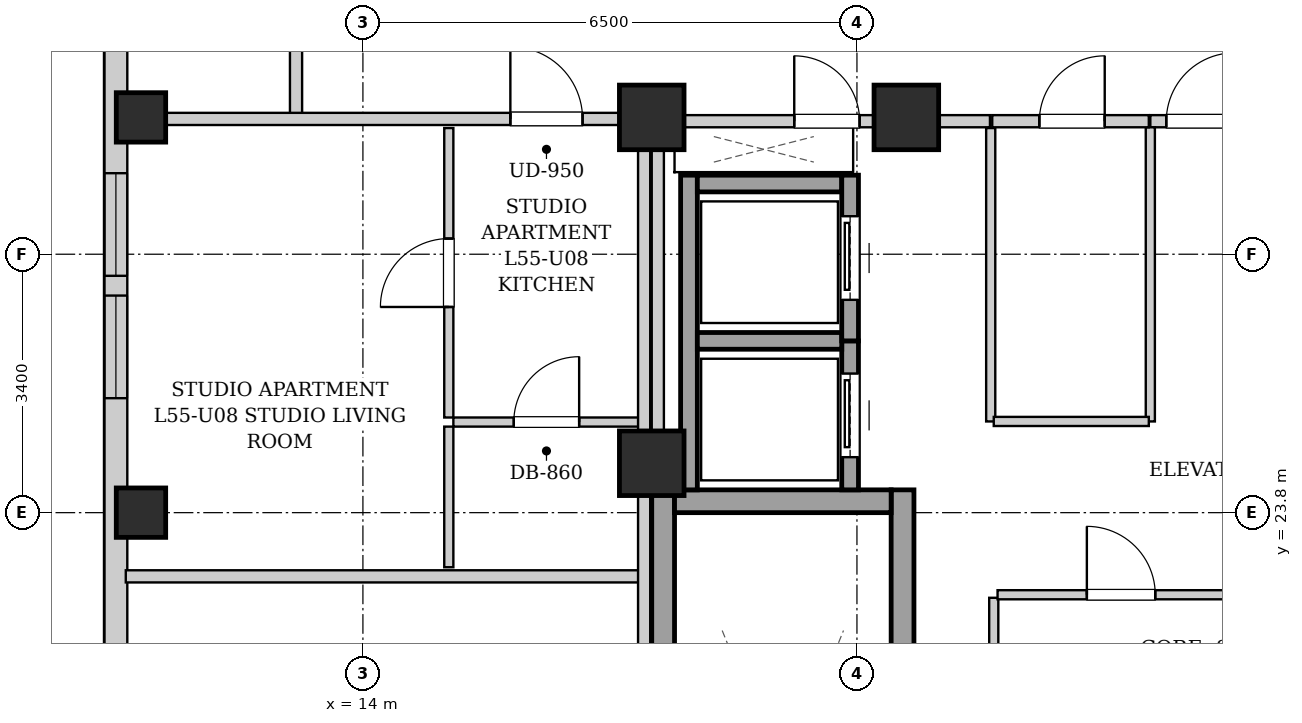
"""IFC4 building model, lengths in metres.
Left out: names, types, materials, properties, quantities, classifications, styles, units other than length and angle.
Written with IfcOpenShell. Run it as: python <this file> out.ifc"""

import sys

from ifc_helpers import new_model, si_unit, direction, frame, frame_2d, origin, origin_2d, place, context, subcontext, project, spatial, rectangle, extrude, element, fill, save


model = new_model("IFC4")
c1 = context("Model", 3, precision=1e-05, world=origin(), true_north=direction((0.0, 1.0)))
c2 = subcontext(c1, "Body", "Model", "MODEL_VIEW")
j1 = project(units=[si_unit("LENGTHUNIT", "METRE"), si_unit("PLANEANGLEUNIT", "RADIAN")], contexts=[c1])
p1 = place(None, origin())
s1 = spatial("IfcSite", under=j1, at=p1, CompositionType="ELEMENT")
p2 = place(p1, origin())
s2 = spatial("IfcBuilding", under=s1, at=p2, CompositionType="ELEMENT")
p3 = place(p2, frame((0.0, 0.0, 190.9)))
s3 = spatial("IfcBuildingStorey", under=s2, at=p3, CompositionType="ELEMENT", Elevation=190.9)
for number, where, z_axis, x_axis in (
    (1, (11.08, 23.8, 0.0), (0.0, 0.0, 1.0), (1.0, 0.0, 0.0)),
    (2, (11.08, 29.0, 0.0), (0.0, 0.0, 1.0), (1.0, 0.0, 0.0)),
):
    element("IfcColumn", number, at=place(p3, frame(where, z_axis=z_axis, x_axis=x_axis)), inside=s3, PredefinedType="COLUMN", context=c2, shape_type="SweptSolid", body=[
        extrude(rectangle(XDim=0.65, YDim=0.65, at=origin_2d()), origin(), (0.0, 0.0, 1.0), 3.3),
    ])
for number, where, z_axis, x_axis in (
    (3, (17.8, 29.0, 0.0), (0.0, 0.0, 1.0), (1.0, 0.0, 0.0)),
    (4, (21.15, 29.0, 0.0), (0.0, 0.0, 1.0), (1.0, 0.0, 0.0)),
    (5, (17.8, 24.45, 0.0), (0.0, 0.0, 1.0), (1.0, 0.0, 0.0)),
):
    element("IfcColumn", number, at=place(p3, frame(where, z_axis=z_axis, x_axis=x_axis)), inside=s3, PredefinedType="COLUMN", context=c2, shape_type="SweptSolid", body=[
        extrude(rectangle(XDim=0.85, YDim=0.85, at=origin_2d()), origin(), (0.0, 0.0, 1.0), 3.3),
    ])
p4 = place(p3, frame((10.75, 6.3, 0.0), z_axis=(0.0, 0.0, 1.0), x_axis=(0.0, 1.0, 0.0)))
e6 = element("IfcWall", 6, at=p4, inside=s3, PredefinedType="SOLIDWALL", context=c2, shape_type="SweptSolid", body=[
    extrude(rectangle(XDim=31.4, YDim=0.3, at=frame_2d((15.7, 0.0))), origin(), (0.0, 0.0, 1.0), 3.04),
])
p5 = place(p4, frame((1.504, 0.0, 0.55)))
e7 = element("IfcOpeningElement", 7, at=p5, cuts=e6, PredefinedType="OPENING", context=c2, shape_type="SweptSolid", body=[
    extrude(rectangle(XDim=1.35, YDim=1.2, at=frame_2d((0.675, 0.6))), frame((0.0, 0.16, 0.0), z_axis=(0.0, -1.0, 0.0), x_axis=(1.0, 0.0, 0.0)), (0.0, 0.0, 1.0), 0.32),
])
p6 = place(p4, frame((28.546, 0.0, 0.55)))
e8 = element("IfcOpeningElement", 8, at=p6, cuts=e6, PredefinedType="OPENING", context=c2, shape_type="SweptSolid", body=[
    extrude(rectangle(XDim=1.35, YDim=1.2, at=frame_2d((0.675, 0.6))), frame((0.0, 0.16, 0.0), z_axis=(0.0, -1.0, 0.0), x_axis=(1.0, 0.0, 0.0)), (0.0, 0.0, 1.0), 0.32),
])
p7 = place(p4, frame((11.85, 0.0, 0.55)))
e9 = element("IfcOpeningElement", 9, at=p7, cuts=e6, PredefinedType="OPENING", context=c2, shape_type="SweptSolid", body=[
    extrude(rectangle(XDim=1.35, YDim=1.2, at=frame_2d((0.675, 0.6))), frame((0.0, 0.16, 0.0), z_axis=(0.0, -1.0, 0.0), x_axis=(1.0, 0.0, 0.0)), (0.0, 0.0, 1.0), 0.32),
])
p8 = place(p4, frame((9.185, 0.0, 0.55)))
e10 = element("IfcOpeningElement", 10, at=p8, cuts=e6, PredefinedType="OPENING", context=c2, shape_type="SweptSolid", body=[
    extrude(rectangle(XDim=1.35, YDim=1.2, at=frame_2d((0.675, 0.6))), frame((0.0, 0.16, 0.0), z_axis=(0.0, -1.0, 0.0), x_axis=(1.0, 0.0, 0.0)), (0.0, 0.0, 1.0), 0.32),
])
p9 = place(p4, frame((19.006, 0.0, 0.55)))
e11 = element("IfcOpeningElement", 11, at=p9, cuts=e6, PredefinedType="OPENING", context=c2, shape_type="SweptSolid", body=[
    extrude(rectangle(XDim=1.35, YDim=1.2, at=frame_2d((0.675, 0.6))), frame((0.0, 0.16, 0.0), z_axis=(0.0, -1.0, 0.0), x_axis=(1.0, 0.0, 0.0)), (0.0, 0.0, 1.0), 0.32),
])
p10 = place(p4, frame((20.616, 0.0, 0.55)))
e12 = element("IfcOpeningElement", 12, at=p10, cuts=e6, PredefinedType="OPENING", context=c2, shape_type="SweptSolid", body=[
    extrude(rectangle(XDim=1.35, YDim=1.2, at=frame_2d((0.675, 0.6))), frame((0.0, 0.16, 0.0), z_axis=(0.0, -1.0, 0.0), x_axis=(1.0, 0.0, 0.0)), (0.0, 0.0, 1.0), 0.32),
])
for number, where, z_axis, x_axis in (
    (13, (17.95, 15.1, 0.0), (0.0, 0.0, 1.0), (0.0, 1.0, 0.0)),
    (14, (21.1, 15.1, 0.0), (0.0, 0.0, 1.0), (0.0, 1.0, 0.0)),
):
    element("IfcWall", number, at=place(p3, frame(where, z_axis=z_axis, x_axis=x_axis)), inside=s3, PredefinedType="SHEAR", context=c2, shape_type="SweptSolid", body=[
        extrude(rectangle(XDim=9.0, YDim=0.3, at=frame_2d((4.5, 0.0))), origin(), (0.0, 0.0, 1.0), 3.04),
    ])
p11 = place(p3, frame((18.1, 23.95, 0.0), z_axis=(0.0, 0.0, 1.0), x_axis=(1.0, 0.0, 0.0)))
e15 = element("IfcWall", 15, at=p11, inside=s3, PredefinedType="SHEAR", context=c2, shape_type="SweptSolid", body=[
    extrude(rectangle(XDim=2.85, YDim=0.3, at=frame_2d((1.425, 0.0))), origin(), (0.0, 0.0, 1.0), 3.04),
])
p12 = place(p3, frame((18.29, 24.1, 0.0), z_axis=(0.0, 0.0, 1.0), x_axis=(0.0, 1.0, 0.0)))
e16 = element("IfcWall", 16, at=p12, inside=s3, PredefinedType="SHEAR", context=c2, shape_type="SweptSolid", body=[
    extrude(rectangle(XDim=4.14, YDim=0.22, at=frame_2d((2.07, 0.0))), origin(), (0.0, 0.0, 1.0), 3.04),
])
p13 = place(p3, frame((20.41, 24.1, 0.0), z_axis=(0.0, 0.0, 1.0), x_axis=(0.0, 1.0, 0.0)))
e17 = element("IfcWall", 17, at=p13, inside=s3, PredefinedType="SHEAR", context=c2, shape_type="SweptSolid", body=[
    extrude(rectangle(XDim=1.96, YDim=0.22, at=frame_2d((0.98, 0.0))), origin(), (0.0, 0.0, 1.0), 3.04),
])
p14 = place(p13, frame((0.43, 0.0, 0.0)))
e18 = element("IfcOpeningElement", 18, at=p14, cuts=e17, PredefinedType="OPENING", context=c2, shape_type="SweptSolid", body=[
    extrude(rectangle(XDim=1.1, YDim=2.15, at=frame_2d((0.55, 1.075))), frame((0.0, 0.12, 0.0), z_axis=(0.0, -1.0, 0.0), x_axis=(1.0, 0.0, 0.0)), (0.0, 0.0, 1.0), 0.24),
])
for number, where, z_axis, x_axis in (
    (19, (18.4, 26.06, 0.0), (0.0, 0.0, 1.0), (1.0, 0.0, 0.0)),
    (20, (18.4, 28.13, 0.0), (0.0, 0.0, 1.0), (1.0, 0.0, 0.0)),
):
    element("IfcWall", number, at=place(p3, frame(where, z_axis=z_axis, x_axis=x_axis)), inside=s3, PredefinedType="SHEAR", context=c2, shape_type="SweptSolid", body=[
        extrude(rectangle(XDim=1.9, YDim=0.22, at=frame_2d((0.95, 0.0))), origin(), (0.0, 0.0, 1.0), 3.04),
    ])
p15 = place(p3, frame((20.41, 26.06, 0.0), z_axis=(0.0, 0.0, 1.0), x_axis=(0.0, 1.0, 0.0)))
e21 = element("IfcWall", 21, at=p15, inside=s3, PredefinedType="SHEAR", context=c2, shape_type="SweptSolid", body=[
    extrude(rectangle(XDim=2.18, YDim=0.22, at=frame_2d((1.09, 0.0))), origin(), (0.0, 0.0, 1.0), 3.04),
])
p16 = place(p15, frame((0.54, 0.0, 0.0)))
e22 = element("IfcOpeningElement", 22, at=p16, cuts=e21, PredefinedType="OPENING", context=c2, shape_type="SweptSolid", body=[
    extrude(rectangle(XDim=1.1, YDim=2.15, at=frame_2d((0.55, 1.075))), frame((0.0, 0.12, 0.0), z_axis=(0.0, -1.0, 0.0), x_axis=(1.0, 0.0, 0.0)), (0.0, 0.0, 1.0), 0.24),
])
p17 = place(p3, frame((17.88, 24.12, 0.0), z_axis=(0.0, 0.0, 1.0), x_axis=(0.0, 1.0, 0.0)))
e23 = element("IfcWall", 23, at=p17, inside=s3, PredefinedType="PARTITIONING", context=c2, shape_type="SweptSolid", body=[
    extrude(rectangle(XDim=4.76, YDim=0.16, at=frame_2d((2.38, 0.0))), origin(), (0.0, 0.0, 1.0), 3.04),
])
p18 = place(p3, frame((24.36, 28.95, 0.0), z_axis=(0.0, 0.0, 1.0), x_axis=(1.0, 0.0, 0.0)))
e24 = element("IfcWall", 24, at=p18, inside=s3, PredefinedType="PARTITIONING", context=c2, shape_type="SweptSolid", body=[
    extrude(rectangle(XDim=1.32, YDim=0.16, at=frame_2d((0.66, 0.0))), origin(), (0.0, 0.0, 1.0), 2.556),
])
p19 = place(p18, frame((0.21, 0.0, 0.0)))
e25 = element("IfcOpeningElement", 25, at=p19, cuts=e24, PredefinedType="OPENING", context=c2, shape_type="SweptSolid", body=[
    extrude(rectangle(XDim=0.9, YDim=2.05, at=frame_2d((0.45, 1.025))), frame((0.0, 0.09, 0.0), z_axis=(0.0, -1.0, 0.0), x_axis=(1.0, 0.0, 0.0)), (0.0, 0.0, 1.0), 0.18),
])
p20 = place(p3, frame((17.96, 28.95, 0.0), z_axis=(0.0, 0.0, 1.0), x_axis=(1.0, 0.0, 0.0)))
e26 = element("IfcWall", 26, at=p20, inside=s3, PredefinedType="PARTITIONING", context=c2, shape_type="SweptSolid", body=[
    extrude(rectangle(XDim=4.29, YDim=0.16, at=frame_2d((2.145, 0.0))), origin(), (0.0, 0.0, 1.0), 2.556),
])
p21 = place(p20, frame((1.715, 0.0, 0.0)))
e27 = element("IfcOpeningElement", 27, at=p21, cuts=e26, PredefinedType="OPENING", context=c2, shape_type="SweptSolid", body=[
    extrude(rectangle(XDim=0.86, YDim=2.05, at=frame_2d((0.43, 1.025))), frame((0.0, 0.09, 0.0), z_axis=(0.0, -1.0, 0.0), x_axis=(1.0, 0.0, 0.0)), (0.0, 0.0, 1.0), 0.18),
])
p22 = place(p3, frame((24.36, 25.0, 0.0), z_axis=(0.0, 0.0, 1.0), x_axis=(0.0, 1.0, 0.0)))
e28 = element("IfcWall", 28, at=p22, inside=s3, PredefinedType="PARTITIONING", context=c2, shape_type="SweptSolid", body=[
    extrude(rectangle(XDim=3.87, YDim=0.12, at=frame_2d((1.935, 0.0))), origin(), (0.0, 0.0, 1.0), 3.04),
])
p23 = place(p3, frame((22.26, 25.0, 0.0), z_axis=(0.0, 0.0, 1.0), x_axis=(0.0, 1.0, 0.0)))
e29 = element("IfcWall", 29, at=p23, inside=s3, PredefinedType="PARTITIONING", context=c2, shape_type="SweptSolid", body=[
    extrude(rectangle(XDim=3.86, YDim=0.12, at=frame_2d((1.93, 0.0))), origin(), (0.0, 0.0, 1.0), 3.04),
])
p24 = place(p3, frame((22.3, 25.0, 0.0), z_axis=(0.0, 0.0, 1.0), x_axis=(1.0, 0.0, 0.0)))
e30 = element("IfcWall", 30, at=p24, inside=s3, PredefinedType="PARTITIONING", context=c2, shape_type="SweptSolid", body=[
    extrude(rectangle(XDim=2.04, YDim=0.12, at=frame_2d((1.02, 0.0))), origin(), (0.0, 0.0, 1.0), 3.04),
])
p25 = place(p3, frame((22.28, 28.95, 0.0), z_axis=(0.0, 0.0, 1.0), x_axis=(1.0, 0.0, 0.0)))
e31 = element("IfcWall", 31, at=p25, inside=s3, PredefinedType="PARTITIONING", context=c2, shape_type="SweptSolid", body=[
    extrude(rectangle(XDim=2.06, YDim=0.16, at=frame_2d((1.03, 0.0))), origin(), (0.0, 0.0, 1.0), 2.556),
])
p26 = place(p25, frame((0.62, 0.0, 0.0)))
e32 = element("IfcOpeningElement", 32, at=p26, cuts=e31, PredefinedType="OPENING", context=c2, shape_type="SweptSolid", body=[
    extrude(rectangle(XDim=0.86, YDim=2.05, at=frame_2d((0.43, 1.025))), frame((0.0, 0.09, 0.0), z_axis=(0.0, -1.0, 0.0), x_axis=(1.0, 0.0, 0.0)), (0.0, 0.0, 1.0), 0.18),
])
p27 = place(p3, frame((22.3, 20.62, 0.0), z_axis=(0.0, 0.0, 1.0), x_axis=(0.0, 1.0, 0.0)))
e33 = element("IfcWall", 33, at=p27, inside=s3, PredefinedType="PARTITIONING", context=c2, shape_type="SweptSolid", body=[
    extrude(rectangle(XDim=2.06, YDim=0.12, at=frame_2d((1.03, 0.0))), origin(), (0.0, 0.0, 1.0), 3.04),
])
p28 = place(p3, frame((22.35, 22.72, 0.0), z_axis=(0.0, 0.0, 1.0), x_axis=(1.0, 0.0, 0.0)))
e34 = element("IfcWall", 34, at=p28, inside=s3, PredefinedType="PARTITIONING", context=c2, shape_type="SweptSolid", body=[
    extrude(rectangle(XDim=7.27, YDim=0.12, at=frame_2d((3.635, 0.0))), origin(), (0.0, 0.0, 1.0), 3.04),
])
p29 = place(p28, frame((1.175, 0.0, 0.0)))
e35 = element("IfcOpeningElement", 35, at=p29, cuts=e34, PredefinedType="OPENING", context=c2, shape_type="SweptSolid", body=[
    extrude(rectangle(XDim=0.9, YDim=2.05, at=frame_2d((0.45, 1.025))), frame((0.0, 0.07, 0.0), z_axis=(0.0, -1.0, 0.0), x_axis=(1.0, 0.0, 0.0)), (0.0, 0.0, 1.0), 0.14),
])
p30 = place(p28, frame((4.725, 0.0, 0.0)))
e36 = element("IfcOpeningElement", 36, at=p30, cuts=e34, PredefinedType="OPENING", context=c2, shape_type="SweptSolid", body=[
    extrude(rectangle(XDim=0.9, YDim=2.05, at=frame_2d((0.45, 1.025))), frame((0.0, 0.07, 0.0), z_axis=(0.0, -1.0, 0.0), x_axis=(1.0, 0.0, 0.0)), (0.0, 0.0, 1.0), 0.14),
])
p31 = place(p3, frame((13.12, 28.98, 0.0), z_axis=(0.0, 0.0, 1.0), x_axis=(0.0, 1.0, 0.0)))
e37 = element("IfcWall", 37, at=p31, inside=s3, PredefinedType="PARTITIONING", context=c2, shape_type="SweptSolid", body=[
    extrude(rectangle(XDim=1.58, YDim=0.16, at=frame_2d((0.79, 0.0))), origin(), (0.0, 0.0, 1.0), 3.04),
])
p32 = place(p3, frame((10.88, 22.962, 0.0), z_axis=(0.0, 0.0, 1.0), x_axis=(1.0, 0.0, 0.0)))
e38 = element("IfcWall", 38, at=p32, inside=s3, PredefinedType="PARTITIONING", context=c2, shape_type="SweptSolid", body=[
    extrude(rectangle(XDim=6.76, YDim=0.16, at=frame_2d((3.38, 0.0))), origin(), (0.0, 0.0, 1.0), 3.04),
])
p33 = place(p3, frame((10.88, 28.98, 0.0), z_axis=(0.0, 0.0, 1.0), x_axis=(1.0, 0.0, 0.0)))
e39 = element("IfcWall", 39, at=p33, inside=s3, PredefinedType="PARTITIONING", context=c2, shape_type="SweptSolid", body=[
    extrude(rectangle(XDim=6.88, YDim=0.16, at=frame_2d((3.44, 0.0))), origin(), (0.0, 0.0, 1.0), 2.556),
])
p34 = place(p33, frame((5.06, 0.0, 0.0)))
e40 = element("IfcOpeningElement", 40, at=p34, cuts=e39, PredefinedType="OPENING", context=c2, shape_type="SweptSolid", body=[
    extrude(rectangle(XDim=0.95, YDim=2.1, at=frame_2d((0.475, 1.05))), frame((0.0, 0.09, 0.0), z_axis=(0.0, -1.0, 0.0), x_axis=(1.0, 0.0, 0.0)), (0.0, 0.0, 1.0), 0.18),
])
p35 = place(p3, frame((15.19, 24.992, 0.0), z_axis=(0.0, 0.0, 1.0), x_axis=(1.0, 0.0, 0.0)))
e41 = element("IfcWall", 41, at=p35, inside=s3, PredefinedType="PARTITIONING", context=c2, shape_type="SweptSolid", body=[
    extrude(rectangle(XDim=2.45, YDim=0.12, at=frame_2d((1.225, 0.0))), origin(), (0.0, 0.0, 1.0), 3.04),
])
p36 = place(p35, frame((0.795, 0.0, 0.0)))
e42 = element("IfcOpeningElement", 42, at=p36, cuts=e41, PredefinedType="OPENING", context=c2, shape_type="SweptSolid", body=[
    extrude(rectangle(XDim=0.86, YDim=2.05, at=frame_2d((0.43, 1.025))), frame((0.0, 0.07, 0.0), z_axis=(0.0, -1.0, 0.0), x_axis=(1.0, 0.0, 0.0)), (0.0, 0.0, 1.0), 0.14),
])
p37 = place(p3, frame((15.13, 23.082, 0.0), z_axis=(0.0, 0.0, 1.0), x_axis=(0.0, 1.0, 0.0)))
e43 = element("IfcWall", 43, at=p37, inside=s3, PredefinedType="PARTITIONING", context=c2, shape_type="SweptSolid", body=[
    extrude(rectangle(XDim=1.85, YDim=0.12, at=frame_2d((0.925, 0.0))), origin(), (0.0, 0.0, 1.0), 3.04),
])
p38 = place(p3, frame((15.13, 25.052, 0.0), z_axis=(0.0, 0.0, 1.0), x_axis=(0.0, 1.0, 0.0)))
e44 = element("IfcWall", 44, at=p38, inside=s3, PredefinedType="PARTITIONING", context=c2, shape_type="SweptSolid", body=[
    extrude(rectangle(XDim=3.808, YDim=0.12, at=frame_2d((1.904, 0.0))), origin(), (0.0, 0.0, 1.0), 3.04),
])
p39 = place(p38, frame((1.454, 0.0, 0.0)))
e45 = element("IfcOpeningElement", 45, at=p39, cuts=e44, PredefinedType="OPENING", context=c2, shape_type="SweptSolid", body=[
    extrude(rectangle(XDim=0.9, YDim=2.05, at=frame_2d((0.45, 1.025))), frame((0.0, 0.07, 0.0), z_axis=(0.0, -1.0, 0.0), x_axis=(1.0, 0.0, 0.0)), (0.0, 0.0, 1.0), 0.14),
])
p40 = place(p3, frame((17.7, 15.02, 0.0), z_axis=(0.0, 0.0, 1.0), x_axis=(0.0, 1.0, 0.0)))
e46 = element("IfcWall", 46, at=p40, inside=s3, PredefinedType="PARTITIONING", context=c2, shape_type="SweptSolid", body=[
    extrude(rectangle(XDim=13.98, YDim=0.16, at=frame_2d((6.99, 0.0))), origin(), (0.0, 0.0, 1.0), 3.04),
])
p41 = place(p14, origin())
e47 = element("IfcDoor", 47, at=p41, inside=s3, OperationType="SLIDING_TO_LEFT", PredefinedType="DOOR", context=c2, shape_type="SweptSolid", body=[
    extrude(rectangle(XDim=1.1, YDim=2.15, at=frame_2d((0.55, 1.075))), frame((0.0, 0.025, 0.0), z_axis=(0.0, -1.0, 0.0), x_axis=(1.0, 0.0, 0.0)), (0.0, 0.0, 1.0), 0.05),
])
fill(e18, e47)
p42 = place(p16, origin())
e48 = element("IfcDoor", 48, at=p42, inside=s3, OperationType="SLIDING_TO_LEFT", PredefinedType="DOOR", context=c2, shape_type="SweptSolid", body=[
    extrude(rectangle(XDim=1.1, YDim=2.15, at=frame_2d((0.55, 1.075))), frame((0.0, 0.025, 0.0), z_axis=(0.0, -1.0, 0.0), x_axis=(1.0, 0.0, 0.0)), (0.0, 0.0, 1.0), 0.05),
])
fill(e22, e48)
p43 = place(p19, origin())
e49 = element("IfcDoor", 49, at=p43, inside=s3, OperationType="SINGLE_SWING_RIGHT", PredefinedType="DOOR", context=c2, shape_type="SweptSolid", body=[
    extrude(rectangle(XDim=0.9, YDim=2.05, at=frame_2d((0.45, 1.025))), frame((0.0, 0.025, 0.0), z_axis=(0.0, -1.0, 0.0), x_axis=(1.0, 0.0, 0.0)), (0.0, 0.0, 1.0), 0.05),
])
fill(e25, e49)
p44 = place(p21, origin())
e50 = element("IfcDoor", 50, at=p44, inside=s3, OperationType="SINGLE_SWING_LEFT", PredefinedType="DOOR", context=c2, shape_type="SweptSolid", body=[
    extrude(rectangle(XDim=0.86, YDim=2.05, at=frame_2d((0.43, 1.025))), frame((0.0, 0.025, 0.0), z_axis=(0.0, -1.0, 0.0), x_axis=(1.0, 0.0, 0.0)), (0.0, 0.0, 1.0), 0.05),
])
fill(e27, e50)
p45 = place(p26, origin())
e51 = element("IfcDoor", 51, at=p45, inside=s3, OperationType="SINGLE_SWING_RIGHT", PredefinedType="DOOR", context=c2, shape_type="SweptSolid", body=[
    extrude(rectangle(XDim=0.86, YDim=2.05, at=frame_2d((0.43, 1.025))), frame((0.0, 0.025, 0.0), z_axis=(0.0, -1.0, 0.0), x_axis=(1.0, 0.0, 0.0)), (0.0, 0.0, 1.0), 0.05),
])
fill(e32, e51)
p46 = place(p29, origin())
e52 = element("IfcDoor", 52, at=p46, inside=s3, OperationType="SINGLE_SWING_LEFT", PredefinedType="DOOR", context=c2, shape_type="SweptSolid", body=[
    extrude(rectangle(XDim=0.9, YDim=2.05, at=frame_2d((0.45, 1.025))), frame((0.0, 0.025, 0.0), z_axis=(0.0, -1.0, 0.0), x_axis=(1.0, 0.0, 0.0)), (0.0, 0.0, 1.0), 0.05),
])
fill(e35, e52)
p47 = place(p34, origin())
e53 = element("IfcDoor", 53, at=p47, inside=s3, OperationType="SINGLE_SWING_LEFT", PredefinedType="DOOR", context=c2, shape_type="SweptSolid", body=[
    extrude(rectangle(XDim=0.95, YDim=2.1, at=frame_2d((0.475, 1.05))), frame((0.0, 0.025, 0.0), z_axis=(0.0, -1.0, 0.0), x_axis=(1.0, 0.0, 0.0)), (0.0, 0.0, 1.0), 0.05),
])
fill(e40, e53)
p48 = place(p36, origin())
e54 = element("IfcDoor", 54, at=p48, inside=s3, OperationType="SINGLE_SWING_RIGHT", PredefinedType="DOOR", context=c2, shape_type="SweptSolid", body=[
    extrude(rectangle(XDim=0.86, YDim=2.05, at=frame_2d((0.43, 1.025))), frame((0.0, 0.025, 0.0), z_axis=(0.0, -1.0, 0.0), x_axis=(1.0, 0.0, 0.0)), (0.0, 0.0, 1.0), 0.05),
])
fill(e42, e54)
p49 = place(p39, origin())
e55 = element("IfcDoor", 55, at=p49, inside=s3, OperationType="SINGLE_SWING_LEFT", PredefinedType="DOOR", context=c2, shape_type="SweptSolid", body=[
    extrude(rectangle(XDim=0.9, YDim=2.05, at=frame_2d((0.45, 1.025))), frame((0.0, 0.025, 0.0), z_axis=(0.0, -1.0, 0.0), x_axis=(1.0, 0.0, 0.0)), (0.0, 0.0, 1.0), 0.05),
])
fill(e45, e55)
p50 = place(p9, origin())
e56 = element("IfcWindow", 56, at=p50, inside=s3, PartitioningType="SINGLE_PANEL", PredefinedType="WINDOW", context=c2, shape_type="SweptSolid", body=[
    extrude(rectangle(XDim=1.35, YDim=1.2, at=frame_2d((0.675, 0.6))), frame((0.0, 0.03, 0.0), z_axis=(0.0, -1.0, 0.0), x_axis=(1.0, 0.0, 0.0)), (0.0, 0.0, 1.0), 0.06),
])
fill(e11, e56)
p51 = place(p10, origin())
e57 = element("IfcWindow", 57, at=p51, inside=s3, PartitioningType="SINGLE_PANEL", PredefinedType="WINDOW", context=c2, shape_type="SweptSolid", body=[
    extrude(rectangle(XDim=1.35, YDim=1.2, at=frame_2d((0.675, 0.6))), frame((0.0, 0.03, 0.0), z_axis=(0.0, -1.0, 0.0), x_axis=(1.0, 0.0, 0.0)), (0.0, 0.0, 1.0), 0.06),
])
fill(e12, e57)
save(model, sys.argv[1])
